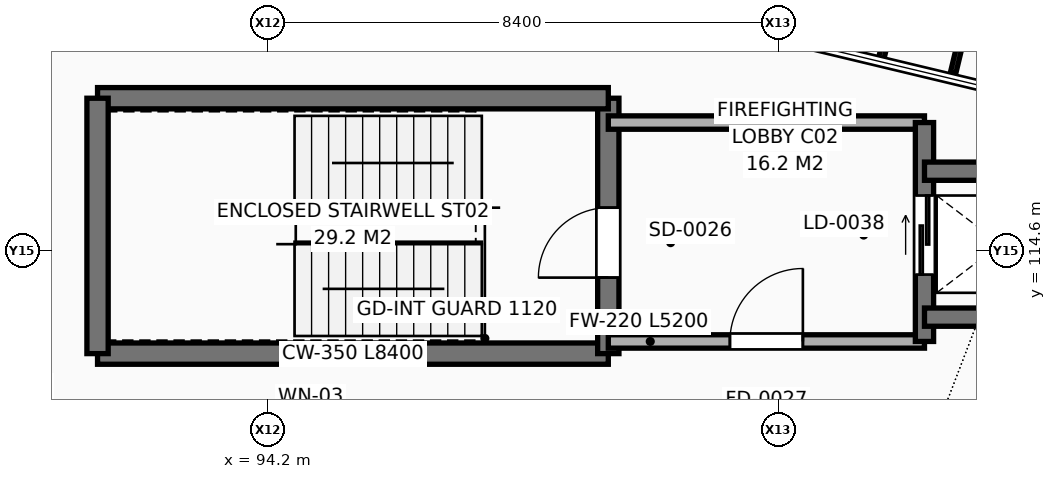
"""IFC4 building model, lengths in metres.
Left out: names, types, materials, properties, quantities, classifications, styles, units other than length and angle.
Written with IfcOpenShell. Run it as: python <this file> out.ifc"""

import sys

from ifc_helpers import new_model, si_unit, direction, frame, frame_2d, origin, place, context, subcontext, project, spatial, rectangle, extrude, element, fill, save


model = new_model("IFC4")
c1 = context("Model", 3, precision=1e-05, world=origin(), true_north=direction((0.0, 1.0)))
c2 = subcontext(c1, "Body", "Model", "MODEL_VIEW")
j1 = project(units=[si_unit("LENGTHUNIT", "METRE"), si_unit("PLANEANGLEUNIT", "RADIAN")], contexts=[c1])
p1 = place(None, origin())
s1 = spatial("IfcSite", under=j1, at=p1, CompositionType="ELEMENT")
p2 = place(p1, origin())
s2 = spatial("IfcBuilding", under=s1, at=p2, CompositionType="ELEMENT")
p3 = place(p2, frame((0.0, 0.0, 9.6)))
s3 = spatial("IfcBuildingStorey", under=s2, at=p3, CompositionType="ELEMENT", Elevation=9.6)
p4 = place(p3, frame((98.941, 111.499, 0.0), z_axis=(0.0, 0.0, 1.0), x_axis=(-0.999197908265, 0.040044227027, 0.0)))
e1 = element("IfcWall", 1, at=p4, inside=s3, PredefinedType="SOLIDWALL", context=c2, shape_type="SweptSolid", body=[
    extrude(rectangle(XDim=12.925, YDim=0.34, at=frame_2d((6.462, 0.0))), origin(), (0.0, 0.0, 1.0), 3.387),
])
p5 = place(p4, frame((3.308, 0.0, 0.9)))
e2 = element("IfcOpeningElement", 2, at=p5, cuts=e1, PredefinedType="OPENING", context=c2, shape_type="SweptSolid", body=[
    extrude(rectangle(XDim=1.5, YDim=2.1, at=frame_2d((0.75, 1.05))), frame((0.0, 0.18, 0.0), z_axis=(0.0, -1.0, 0.0), x_axis=(1.0, 0.0, 0.0)), (0.0, 0.0, 1.0), 0.36),
])
p6 = place(p4, frame((8.117, 0.0, 0.9)))
e3 = element("IfcOpeningElement", 3, at=p6, cuts=e1, PredefinedType="OPENING", context=c2, shape_type="SweptSolid", body=[
    extrude(rectangle(XDim=1.5, YDim=2.1, at=frame_2d((0.75, 1.05))), frame((0.0, 0.18, 0.0), z_axis=(0.0, -1.0, 0.0), x_axis=(1.0, 0.0, 0.0)), (0.0, 0.0, 1.0), 0.36),
])
p7 = place(p3, frame((91.4, 112.9, 0.0), z_axis=(0.0, 0.0, 1.0), x_axis=(1.0, 0.0, 0.0)))
e4 = element("IfcWall", 4, at=p7, inside=s3, PredefinedType="SHEAR", context=c2, shape_type="SweptSolid", body=[
    extrude(rectangle(XDim=8.4, YDim=0.35, at=frame_2d((4.2, 0.0))), origin(), (0.0, 0.0, 1.0), 3.92),
])
p8 = place(p3, frame((99.8, 112.9, 0.0), z_axis=(0.0, 0.0, 1.0), x_axis=(0.0, 1.0, 0.0)))
e5 = element("IfcWall", 5, at=p8, inside=s3, PredefinedType="SHEAR", context=c2, shape_type="SweptSolid", body=[
    extrude(rectangle(XDim=4.2, YDim=0.35, at=frame_2d((2.1, 0.0))), origin(), (0.0, 0.0, 1.0), 3.92),
])
p9 = place(p8, frame((1.25, 0.0, 0.0)))
e6 = element("IfcOpeningElement", 6, at=p9, cuts=e5, PredefinedType="OPENING", context=c2, shape_type="SweptSolid", body=[
    extrude(rectangle(XDim=1.15, YDim=2.2, at=frame_2d((0.575, 1.1))), frame((0.0, 0.185, 0.0), z_axis=(0.0, -1.0, 0.0), x_axis=(1.0, 0.0, 0.0)), (0.0, 0.0, 1.0), 0.37),
])
p10 = place(p3, frame((99.8, 117.1, 0.0), z_axis=(0.0, 0.0, 1.0), x_axis=(-1.0, 0.0, 0.0)))
e7 = element("IfcWall", 7, at=p10, inside=s3, PredefinedType="SHEAR", context=c2, shape_type="SweptSolid", body=[
    extrude(rectangle(XDim=8.4, YDim=0.35, at=frame_2d((4.2, 0.0))), origin(), (0.0, 0.0, 1.0), 3.92),
])
p11 = place(p3, frame((91.4, 117.1, 0.0), z_axis=(0.0, 0.0, 1.0), x_axis=(0.0, -1.0, 0.0)))
e8 = element("IfcWall", 8, at=p11, inside=s3, PredefinedType="SHEAR", context=c2, shape_type="SweptSolid", body=[
    extrude(rectangle(XDim=4.2, YDim=0.35, at=frame_2d((2.1, 0.0))), origin(), (0.0, 0.0, 1.0), 3.92),
])
p12 = place(p3, frame((99.8, 113.1, 0.0), z_axis=(0.0, 0.0, 1.0), x_axis=(1.0, 0.0, 0.0)))
e9 = element("IfcWall", 9, at=p12, inside=s3, PredefinedType="SOLIDWALL", context=c2, shape_type="SweptSolid", body=[
    extrude(rectangle(XDim=5.2, YDim=0.22, at=frame_2d((2.6, 0.0))), origin(), (0.0, 0.0, 1.0), 3.92),
])
p13 = place(p12, frame((2.0, 0.0, 0.0)))
e10 = element("IfcOpeningElement", 10, at=p13, cuts=e9, PredefinedType="OPENING", context=c2, shape_type="SweptSolid", body=[
    extrude(rectangle(XDim=1.2, YDim=2.2, at=frame_2d((0.6, 1.1))), frame((0.0, 0.12, 0.0), z_axis=(0.0, -1.0, 0.0), x_axis=(1.0, 0.0, 0.0)), (0.0, 0.0, 1.0), 0.24),
])
p14 = place(p3, frame((105.0, 116.7, 0.0), z_axis=(0.0, 0.0, 1.0), x_axis=(-1.0, 0.0, 0.0)))
e11 = element("IfcWall", 11, at=p14, inside=s3, PredefinedType="SOLIDWALL", context=c2, shape_type="SweptSolid", body=[
    extrude(rectangle(XDim=5.2, YDim=0.22, at=frame_2d((2.6, 0.0))), origin(), (0.0, 0.0, 1.0), 3.92),
])
p15 = place(p3, frame((105.0, 113.1, 0.0), z_axis=(0.0, 0.0, 1.0), x_axis=(0.0, 1.0, 0.0)))
e12 = element("IfcWall", 12, at=p15, inside=s3, PredefinedType="SHEAR", context=c2, shape_type="SweptSolid", body=[
    extrude(rectangle(XDim=3.6, YDim=0.3, at=frame_2d((1.8, 0.0))), origin(), (0.0, 0.0, 1.0), 3.92),
])
p16 = place(p15, frame((1.1, 0.0, 0.0)))
e13 = element("IfcOpeningElement", 13, at=p16, cuts=e12, PredefinedType="OPENING", context=c2, shape_type="SweptSolid", body=[
    extrude(rectangle(XDim=1.3, YDim=2.3, at=frame_2d((0.65, 1.15))), frame((0.0, 0.16, 0.0), z_axis=(0.0, -1.0, 0.0), x_axis=(1.0, 0.0, 0.0)), (0.0, 0.0, 1.0), 0.32),
])
for number, where, z_axis, x_axis in (
    (14, (107.5, 115.9, 0.0), (0.0, 0.0, 1.0), (-1.0, 0.0, 0.0)),
    (15, (105.0, 113.5, 0.0), (0.0, 0.0, 1.0), (1.0, 0.0, 0.0)),
):
    element("IfcWall", number, at=place(p3, frame(where, z_axis=z_axis, x_axis=x_axis)), inside=s3, PredefinedType="SHEAR", context=c2, shape_type="SweptSolid", body=[
        extrude(rectangle(XDim=2.5, YDim=0.3, at=frame_2d((1.25, 0.0))), origin(), (0.0, 0.0, 1.0), 3.92),
    ])
p17 = place(p9, origin())
e16 = element("IfcDoor", 16, at=p17, inside=s3, OperationType="SINGLE_SWING_LEFT", PredefinedType="DOOR", context=c2, shape_type="SweptSolid", body=[
    extrude(rectangle(XDim=1.15, YDim=2.2, at=frame_2d((0.575, 1.1))), frame((0.0, 0.025, 0.0), z_axis=(0.0, -1.0, 0.0), x_axis=(1.0, 0.0, 0.0)), (0.0, 0.0, 1.0), 0.05),
])
fill(e6, e16)
p18 = place(p13, origin())
e17 = element("IfcDoor", 17, at=p18, inside=s3, OperationType="SINGLE_SWING_RIGHT", PredefinedType="DOOR", context=c2, shape_type="SweptSolid", body=[
    extrude(rectangle(XDim=1.2, YDim=2.2, at=frame_2d((0.6, 1.1))), frame((0.0, 0.025, 0.0), z_axis=(0.0, -1.0, 0.0), x_axis=(1.0, 0.0, 0.0)), (0.0, 0.0, 1.0), 0.05),
])
fill(e10, e17)
p19 = place(p16, origin())
e18 = element("IfcDoor", 18, at=p19, inside=s3, OperationType="SLIDING_TO_LEFT", PredefinedType="DOOR", context=c2, shape_type="SweptSolid", body=[
    extrude(rectangle(XDim=1.3, YDim=2.3, at=frame_2d((0.65, 1.15))), frame((0.0, 0.025, 0.0), z_axis=(0.0, -1.0, 0.0), x_axis=(1.0, 0.0, 0.0)), (0.0, 0.0, 1.0), 0.05),
])
fill(e13, e18)
save(model, sys.argv[1])
